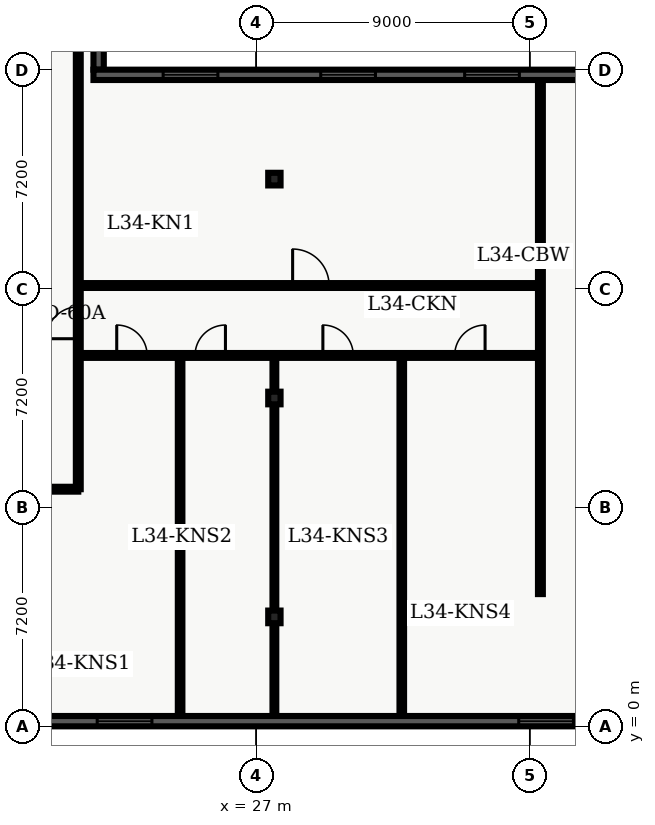
"""IFC4 building model, lengths in metres.
Left out: names, types, materials, properties, quantities, classifications, styles, units other than length and angle.
Written with IfcOpenShell. Run it as: python <this file> out.ifc"""

import sys

from ifc_helpers import new_model, entity, si_unit, converted_unit, direction, frame, origin_with_axes, origin_2d_with_axis, place, context, subcontext, project, spatial, polyline, rectangle, i_section, outline, extrude, element, fill, save


model = new_model("IFC4")
c1 = context("Model", 3, precision=1e-05, world=origin_with_axes(), true_north=direction((0.0, 1.0)))
c2 = subcontext(c1, "Body", "Model", "MODEL_VIEW")
j1 = project(units=[si_unit("LENGTHUNIT", "METRE"), converted_unit("PLANEANGLEUNIT", "DEGREE", entity("IfcPlaneAngleMeasure", 0.017), si_unit("PLANEANGLEUNIT", "RADIAN"), dimensions=[0, 0, 0, 0, 0, 0, 0])], contexts=[c1])
p1 = place(None, origin_with_axes())
s1 = spatial("IfcSite", under=j1, at=p1, CompositionType="ELEMENT")
p2 = place(p1, origin_with_axes())
s2 = spatial("IfcBuilding", under=s1, at=p2, CompositionType="ELEMENT")
p3 = place(p2, frame((0.0, 0.0, 140.7), z_axis=(0.0, 0.0, 1.0), x_axis=(1.0, 0.0, 0.0)))
s3 = spatial("IfcBuildingStorey", under=s2, at=p3, CompositionType="ELEMENT", Elevation=140.7)
for number, where, z_axis, x_axis in (
    (1, (27.6, 3.6, 0.0), (0.0, 0.0, 1.0), (1.0, 0.0, 0.0)),
    (2, (27.6, 10.8, 0.0), (0.0, 0.0, 1.0), (1.0, 0.0, 0.0)),
    (3, (27.6, 18.0, 0.0), (0.0, 0.0, 1.0), (1.0, 0.0, 0.0)),
):
    element("IfcColumn", number, at=place(p3, frame(where, z_axis=z_axis, x_axis=x_axis)), inside=s3, PredefinedType="COLUMN", context=c2, shape_type="SweptSolid", body=[
        extrude(i_section(OverallWidth=0.406, OverallDepth=0.416, WebThickness=0.03, FlangeThickness=0.048, FilletRadius=0.022, at=origin_2d_with_axis()), origin_with_axes(), (0.0, 0.0, 1.0), 3.9),
    ])
p4 = place(p3, frame((2.6, 7.8, 0.0), z_axis=(0.0, 0.0, 1.0), x_axis=(1.0, 0.0, 0.0)))
e4 = element("IfcWall", 4, at=p4, inside=s3, PredefinedType="PARTITIONING", context=c2, shape_type="SweptSolid", body=[
    extrude(outline(polyline([(0.0, -0.08), (18.55, -0.08), (18.55, 0.08), (0.0, 0.08), (0.0, -0.08)])), origin_with_axes(), (0.0, 0.0, 1.0), 2.7),
])
p5 = place(p4, frame((9.245, 0.0, 0.0), z_axis=(0.0, 0.0, 1.0), x_axis=(1.0, 0.0, 0.0)))
e5 = element("IfcOpeningElement", 5, at=p5, cuts=e4, PredefinedType="OPENING", context=c2, shape_type="SweptSolid", body=[
    extrude(rectangle(XDim=1.2, YDim=0.18, at=origin_2d_with_axis()), origin_with_axes(), (0.0, 0.0, 1.0), 2.2),
])
p6 = place(p3, frame((21.15, 7.8, 0.0), z_axis=(0.0, 0.0, 1.0), x_axis=(0.0, 1.0, 0.0)))
e6 = element("IfcWall", 6, at=p6, inside=s3, PredefinedType="PARTITIONING", context=c2, shape_type="SweptSolid", body=[
    extrude(outline(polyline([(0.0, -0.08), (32.7, -0.08), (32.7, 0.08), (0.0, 0.08), (0.0, -0.08)])), origin_with_axes(), (0.0, 0.0, 1.0), 2.7),
])
p7 = place(p6, frame((5.475, 0.0, 0.0), z_axis=(0.0, 0.0, 1.0), x_axis=(1.0, 0.0, 0.0)))
e7 = element("IfcOpeningElement", 7, at=p7, cuts=e6, PredefinedType="OPENING", context=c2, shape_type="SweptSolid", body=[
    extrude(rectangle(XDim=1.05, YDim=0.18, at=origin_2d_with_axis()), origin_with_axes(), (0.0, 0.0, 1.0), 2.15),
])
p8 = place(p3, frame((21.15, 12.2, 0.0), z_axis=(0.0, 0.0, 1.0), x_axis=(1.0, 0.0, 0.0)))
e8 = element("IfcWall", 8, at=p8, inside=s3, PredefinedType="PARTITIONING", context=c2, shape_type="SweptSolid", body=[
    extrude(outline(polyline([(0.0, -0.08), (15.2, -0.08), (15.2, 0.08), (0.0, 0.08), (0.0, -0.08)])), origin_with_axes(), (0.0, 0.0, 1.0), 2.7),
])
p9 = place(p8, frame((1.764, 0.0, 0.0), z_axis=(0.0, 0.0, 1.0), x_axis=(1.0, 0.0, 0.0)))
e9 = element("IfcOpeningElement", 9, at=p9, cuts=e8, PredefinedType="OPENING", context=c2, shape_type="SweptSolid", body=[
    extrude(rectangle(XDim=1.0, YDim=0.18, at=origin_2d_with_axis()), origin_with_axes(), (0.0, 0.0, 1.0), 2.15),
])
p10 = place(p8, frame((4.34, 0.0, 0.0), z_axis=(0.0, 0.0, 1.0), x_axis=(1.0, 0.0, 0.0)))
e10 = element("IfcOpeningElement", 10, at=p10, cuts=e8, PredefinedType="OPENING", context=c2, shape_type="SweptSolid", body=[
    extrude(rectangle(XDim=1.0, YDim=0.18, at=origin_2d_with_axis()), origin_with_axes(), (0.0, 0.0, 1.0), 2.15),
])
p11 = place(p8, frame((8.545, 0.0, 0.0), z_axis=(0.0, 0.0, 1.0), x_axis=(1.0, 0.0, 0.0)))
e11 = element("IfcOpeningElement", 11, at=p11, cuts=e8, PredefinedType="OPENING", context=c2, shape_type="SweptSolid", body=[
    extrude(rectangle(XDim=1.0, YDim=0.18, at=origin_2d_with_axis()), origin_with_axes(), (0.0, 0.0, 1.0), 2.15),
])
p12 = place(p8, frame((12.88, 0.0, 0.0), z_axis=(0.0, 0.0, 1.0), x_axis=(1.0, 0.0, 0.0)))
e12 = element("IfcOpeningElement", 12, at=p12, cuts=e8, PredefinedType="OPENING", context=c2, shape_type="SweptSolid", body=[
    extrude(rectangle(XDim=1.0, YDim=0.18, at=origin_2d_with_axis()), origin_with_axes(), (0.0, 0.0, 1.0), 2.15),
])
p13 = place(p3, frame((21.15, 14.5, 0.0), z_axis=(0.0, 0.0, 1.0), x_axis=(1.0, 0.0, 0.0)))
e13 = element("IfcWall", 13, at=p13, inside=s3, PredefinedType="PARTITIONING", context=c2, shape_type="SweptSolid", body=[
    extrude(outline(polyline([(0.0, -0.08), (15.2, -0.08), (15.2, 0.08), (0.0, 0.08), (0.0, -0.08)])), origin_with_axes(), (0.0, 0.0, 1.0), 2.7),
])
p14 = place(p13, frame((7.65, 0.0, 0.0), z_axis=(0.0, 0.0, 1.0), x_axis=(1.0, 0.0, 0.0)))
e14 = element("IfcOpeningElement", 14, at=p14, cuts=e13, PredefinedType="OPENING", context=c2, shape_type="SweptSolid", body=[
    extrude(rectangle(XDim=1.2, YDim=0.18, at=origin_2d_with_axis()), origin_with_axes(), (0.0, 0.0, 1.0), 2.2),
])
p15 = place(p3, frame((36.35, 4.35, 0.0), z_axis=(0.0, 0.0, 1.0), x_axis=(0.0, 1.0, 0.0)))
e15 = element("IfcWall", 15, at=p15, inside=s3, PredefinedType="PARTITIONING", context=c2, shape_type="SweptSolid", body=[
    extrude(outline(polyline([(0.0, -0.08), (16.95, -0.08), (16.95, 0.08), (0.0, 0.08), (0.0, -0.08)])), origin_with_axes(), (0.0, 0.0, 1.0), 2.7),
])
p16 = place(p3, frame((24.499, 0.335, 0.0), z_axis=(0.0, 0.0, 1.0), x_axis=(0.0, 1.0, 0.0)))
e16 = element("IfcWall", 16, at=p16, inside=s3, PredefinedType="PARTITIONING", context=c2, shape_type="SweptSolid", body=[
    extrude(outline(polyline([(0.0, -0.075), (11.745, -0.075), (11.745, 0.075), (0.0, 0.075), (0.0, -0.075)])), origin_with_axes(), (0.0, 0.0, 1.0), 2.7),
])
p17 = place(p3, frame((27.6, 0.335, 0.0), z_axis=(0.0, 0.0, 1.0), x_axis=(0.0, 1.0, 0.0)))
e17 = element("IfcWall", 17, at=p17, inside=s3, PredefinedType="PARTITIONING", context=c2, shape_type="SweptSolid", body=[
    extrude(outline(polyline([(0.0, -0.062), (11.745, -0.062), (11.745, 0.062), (0.0, 0.062), (0.0, -0.062)])), origin_with_axes(), (0.0, 0.0, 1.0), 2.7),
])
p18 = place(p3, frame((31.79, 0.335, 0.0), z_axis=(0.0, 0.0, 1.0), x_axis=(0.0, 1.0, 0.0)))
e18 = element("IfcWall", 18, at=p18, inside=s3, PredefinedType="PARTITIONING", context=c2, shape_type="SweptSolid", body=[
    extrude(outline(polyline([(0.0, -0.075), (11.745, -0.075), (11.745, 0.075), (0.0, 0.075), (0.0, -0.075)])), origin_with_axes(), (0.0, 0.0, 1.0), 2.7),
])
p19 = place(p3, frame((57.26, 0.17, 0.0), z_axis=(0.0, 0.0, 1.0), x_axis=(-1.0, 0.0, 0.0)))
e19 = element("IfcWall", 19, at=p19, inside=s3, PredefinedType="SOLIDWALL", context=c2, shape_type="SweptSolid", body=[
    extrude(outline(polyline([(0.0, -0.17), (54.86, -0.17), (54.86, 0.17), (0.0, 0.17), (0.0, -0.17)])), origin_with_axes(), (0.0, 0.0, 1.0), 3.66),
])
p20 = place(p19, frame((2.836, 0.0, 0.45), z_axis=(0.0, 0.0, 1.0), x_axis=(1.0, 0.0, 0.0)))
e20 = element("IfcOpeningElement", 20, at=p20, cuts=e19, PredefinedType="OPENING", context=c2, shape_type="SweptSolid", body=[
    extrude(rectangle(XDim=1.8, YDim=0.36, at=origin_2d_with_axis()), origin_with_axes(), (0.0, 0.0, 1.0), 2.1),
])
p21 = place(p19, frame((7.307, 0.0, 0.45), z_axis=(0.0, 0.0, 1.0), x_axis=(1.0, 0.0, 0.0)))
e21 = element("IfcOpeningElement", 21, at=p21, cuts=e19, PredefinedType="OPENING", context=c2, shape_type="SweptSolid", body=[
    extrude(rectangle(XDim=1.8, YDim=0.36, at=origin_2d_with_axis()), origin_with_axes(), (0.0, 0.0, 1.0), 2.1),
])
p22 = place(p19, frame((11.779, 0.0, 0.45), z_axis=(0.0, 0.0, 1.0), x_axis=(1.0, 0.0, 0.0)))
e22 = element("IfcOpeningElement", 22, at=p22, cuts=e19, PredefinedType="OPENING", context=c2, shape_type="SweptSolid", body=[
    extrude(rectangle(XDim=1.8, YDim=0.36, at=origin_2d_with_axis()), origin_with_axes(), (0.0, 0.0, 1.0), 2.1),
])
p23 = place(p19, frame((16.251, 0.0, 0.45), z_axis=(0.0, 0.0, 1.0), x_axis=(1.0, 0.0, 0.0)))
e23 = element("IfcOpeningElement", 23, at=p23, cuts=e19, PredefinedType="OPENING", context=c2, shape_type="SweptSolid", body=[
    extrude(rectangle(XDim=1.8, YDim=0.36, at=origin_2d_with_axis()), origin_with_axes(), (0.0, 0.0, 1.0), 2.1),
])
p24 = place(p19, frame((20.723, 0.0, 0.45), z_axis=(0.0, 0.0, 1.0), x_axis=(1.0, 0.0, 0.0)))
e24 = element("IfcOpeningElement", 24, at=p24, cuts=e19, PredefinedType="OPENING", context=c2, shape_type="SweptSolid", body=[
    extrude(rectangle(XDim=1.8, YDim=0.36, at=origin_2d_with_axis()), origin_with_axes(), (0.0, 0.0, 1.0), 2.1),
])
p25 = place(p19, frame((34.588, 0.0, 0.45), z_axis=(0.0, 0.0, 1.0), x_axis=(1.0, 0.0, 0.0)))
e25 = element("IfcOpeningElement", 25, at=p25, cuts=e19, PredefinedType="OPENING", context=c2, shape_type="SweptSolid", body=[
    extrude(rectangle(XDim=1.8, YDim=0.36, at=origin_2d_with_axis()), origin_with_axes(), (0.0, 0.0, 1.0), 2.1),
])
p26 = place(p19, frame((38.609, 0.0, 0.45), z_axis=(0.0, 0.0, 1.0), x_axis=(1.0, 0.0, 0.0)))
e26 = element("IfcOpeningElement", 26, at=p26, cuts=e19, PredefinedType="OPENING", context=c2, shape_type="SweptSolid", body=[
    extrude(rectangle(XDim=1.8, YDim=0.36, at=origin_2d_with_axis()), origin_with_axes(), (0.0, 0.0, 1.0), 2.1),
])
p27 = place(p19, frame((43.081, 0.0, 0.45), z_axis=(0.0, 0.0, 1.0), x_axis=(1.0, 0.0, 0.0)))
e27 = element("IfcOpeningElement", 27, at=p27, cuts=e19, PredefinedType="OPENING", context=c2, shape_type="SweptSolid", body=[
    extrude(rectangle(XDim=1.8, YDim=0.36, at=origin_2d_with_axis()), origin_with_axes(), (0.0, 0.0, 1.0), 2.1),
])
p28 = place(p19, frame((47.553, 0.0, 0.45), z_axis=(0.0, 0.0, 1.0), x_axis=(1.0, 0.0, 0.0)))
e28 = element("IfcOpeningElement", 28, at=p28, cuts=e19, PredefinedType="OPENING", context=c2, shape_type="SweptSolid", body=[
    extrude(rectangle(XDim=1.8, YDim=0.36, at=origin_2d_with_axis()), origin_with_axes(), (0.0, 0.0, 1.0), 2.1),
])
p29 = place(p19, frame((52.024, 0.0, 0.45), z_axis=(0.0, 0.0, 1.0), x_axis=(1.0, 0.0, 0.0)))
e29 = element("IfcOpeningElement", 29, at=p29, cuts=e19, PredefinedType="OPENING", context=c2, shape_type="SweptSolid", body=[
    extrude(rectangle(XDim=1.8, YDim=0.36, at=origin_2d_with_axis()), origin_with_axes(), (0.0, 0.0, 1.0), 2.1),
])
p30 = place(p3, frame((21.819, 46.46, 0.0), z_axis=(0.0, 0.0, 1.0), x_axis=(0.0, -1.0, 0.0)))
e30 = element("IfcWall", 30, at=p30, inside=s3, PredefinedType="SOLIDWALL", context=c2, shape_type="SweptSolid", body=[
    extrude(outline(polyline([(0.0, -0.17), (24.86, -0.17), (24.86, 0.17), (0.0, 0.17), (0.0, -0.17)])), origin_with_axes(), (0.0, 0.0, 1.0), 3.66),
])
p31 = place(p30, frame((2.966, 0.0, 0.45), z_axis=(0.0, 0.0, 1.0), x_axis=(1.0, 0.0, 0.0)))
e31 = element("IfcOpeningElement", 31, at=p31, cuts=e30, PredefinedType="OPENING", context=c2, shape_type="SweptSolid", body=[
    extrude(rectangle(XDim=1.6, YDim=0.36, at=origin_2d_with_axis()), origin_with_axes(), (0.0, 0.0, 1.0), 2.2),
])
p32 = place(p30, frame((7.698, 0.0, 0.45), z_axis=(0.0, 0.0, 1.0), x_axis=(1.0, 0.0, 0.0)))
e32 = element("IfcOpeningElement", 32, at=p32, cuts=e30, PredefinedType="OPENING", context=c2, shape_type="SweptSolid", body=[
    extrude(rectangle(XDim=1.6, YDim=0.36, at=origin_2d_with_axis()), origin_with_axes(), (0.0, 0.0, 1.0), 2.2),
])
p33 = place(p30, frame((12.43, 0.0, 0.45), z_axis=(0.0, 0.0, 1.0), x_axis=(1.0, 0.0, 0.0)))
e33 = element("IfcOpeningElement", 33, at=p33, cuts=e30, PredefinedType="OPENING", context=c2, shape_type="SweptSolid", body=[
    extrude(rectangle(XDim=1.6, YDim=0.36, at=origin_2d_with_axis()), origin_with_axes(), (0.0, 0.0, 1.0), 2.2),
])
p34 = place(p30, frame((17.162, 0.0, 0.45), z_axis=(0.0, 0.0, 1.0), x_axis=(1.0, 0.0, 0.0)))
e34 = element("IfcOpeningElement", 34, at=p34, cuts=e30, PredefinedType="OPENING", context=c2, shape_type="SweptSolid", body=[
    extrude(rectangle(XDim=1.6, YDim=0.36, at=origin_2d_with_axis()), origin_with_axes(), (0.0, 0.0, 1.0), 2.2),
])
p35 = place(p30, frame((21.894, 0.0, 0.45), z_axis=(0.0, 0.0, 1.0), x_axis=(1.0, 0.0, 0.0)))
e35 = element("IfcOpeningElement", 35, at=p35, cuts=e30, PredefinedType="OPENING", context=c2, shape_type="SweptSolid", body=[
    extrude(rectangle(XDim=1.6, YDim=0.36, at=origin_2d_with_axis()), origin_with_axes(), (0.0, 0.0, 1.0), 2.2),
])
p36 = place(p3, frame((21.649, 21.43, 0.0), z_axis=(0.0, 0.0, 1.0), x_axis=(1.0, 0.0, 0.0)))
e36 = element("IfcWall", 36, at=p36, inside=s3, PredefinedType="SOLIDWALL", context=c2, shape_type="SweptSolid", body=[
    extrude(outline(polyline([(0.0, -0.17), (16.751, -0.17), (16.751, 0.17), (0.0, 0.17), (0.0, -0.17)])), origin_with_axes(), (0.0, 0.0, 1.0), 3.66),
])
p37 = place(p36, frame((3.192, 0.0, 0.45), z_axis=(0.0, 0.0, 1.0), x_axis=(1.0, 0.0, 0.0)))
e37 = element("IfcOpeningElement", 37, at=p37, cuts=e36, PredefinedType="OPENING", context=c2, shape_type="SweptSolid", body=[
    extrude(rectangle(XDim=1.8, YDim=0.36, at=origin_2d_with_axis()), origin_with_axes(), (0.0, 0.0, 1.0), 2.1),
])
p38 = place(p36, frame((8.375, 0.0, 0.45), z_axis=(0.0, 0.0, 1.0), x_axis=(1.0, 0.0, 0.0)))
e38 = element("IfcOpeningElement", 38, at=p38, cuts=e36, PredefinedType="OPENING", context=c2, shape_type="SweptSolid", body=[
    extrude(rectangle(XDim=1.8, YDim=0.36, at=origin_2d_with_axis()), origin_with_axes(), (0.0, 0.0, 1.0), 2.1),
])
p39 = place(p36, frame((13.109, 0.0, 0.45), z_axis=(0.0, 0.0, 1.0), x_axis=(1.0, 0.0, 0.0)))
e39 = element("IfcOpeningElement", 39, at=p39, cuts=e36, PredefinedType="OPENING", context=c2, shape_type="SweptSolid", body=[
    extrude(rectangle(XDim=1.8, YDim=0.36, at=origin_2d_with_axis()), origin_with_axes(), (0.0, 0.0, 1.0), 2.1),
])
p40 = place(p6, frame((5.475, 0.0, 0.0), z_axis=(0.0, 0.0, 1.0), x_axis=(1.0, 0.0, 0.0)))
e40 = element("IfcDoor", 40, at=p40, inside=s3, OperationType="SINGLE_SWING_LEFT", PredefinedType="DOOR", context=c2, shape_type="SweptSolid", body=[
    extrude(rectangle(XDim=1.05, YDim=0.09, at=origin_2d_with_axis()), origin_with_axes(), (0.0, 0.0, 1.0), 2.15),
])
fill(e7, e40)
p41 = place(p8, frame((1.764, 0.0, 0.0), z_axis=(0.0, 0.0, 1.0), x_axis=(1.0, 0.0, 0.0)))
e41 = element("IfcDoor", 41, at=p41, inside=s3, OperationType="SINGLE_SWING_LEFT", PredefinedType="DOOR", context=c2, shape_type="SweptSolid", body=[
    extrude(rectangle(XDim=1.0, YDim=0.09, at=origin_2d_with_axis()), origin_with_axes(), (0.0, 0.0, 1.0), 2.15),
])
fill(e9, e41)
p42 = place(p8, frame((4.34, 0.0, 0.0), z_axis=(0.0, 0.0, 1.0), x_axis=(1.0, 0.0, 0.0)))
e42 = element("IfcDoor", 42, at=p42, inside=s3, OperationType="SINGLE_SWING_RIGHT", PredefinedType="DOOR", context=c2, shape_type="SweptSolid", body=[
    extrude(rectangle(XDim=1.0, YDim=0.09, at=origin_2d_with_axis()), origin_with_axes(), (0.0, 0.0, 1.0), 2.15),
])
fill(e10, e42)
p43 = place(p8, frame((8.545, 0.0, 0.0), z_axis=(0.0, 0.0, 1.0), x_axis=(1.0, 0.0, 0.0)))
e43 = element("IfcDoor", 43, at=p43, inside=s3, OperationType="SINGLE_SWING_LEFT", PredefinedType="DOOR", context=c2, shape_type="SweptSolid", body=[
    extrude(rectangle(XDim=1.0, YDim=0.09, at=origin_2d_with_axis()), origin_with_axes(), (0.0, 0.0, 1.0), 2.15),
])
fill(e11, e43)
p44 = place(p8, frame((12.88, 0.0, 0.0), z_axis=(0.0, 0.0, 1.0), x_axis=(1.0, 0.0, 0.0)))
e44 = element("IfcDoor", 44, at=p44, inside=s3, OperationType="SINGLE_SWING_RIGHT", PredefinedType="DOOR", context=c2, shape_type="SweptSolid", body=[
    extrude(rectangle(XDim=1.0, YDim=0.09, at=origin_2d_with_axis()), origin_with_axes(), (0.0, 0.0, 1.0), 2.15),
])
fill(e12, e44)
p45 = place(p13, frame((7.65, 0.0, 0.0), z_axis=(0.0, 0.0, 1.0), x_axis=(1.0, 0.0, 0.0)))
e45 = element("IfcDoor", 45, at=p45, inside=s3, OperationType="SINGLE_SWING_LEFT", PredefinedType="DOOR", context=c2, shape_type="SweptSolid", body=[
    extrude(rectangle(XDim=1.2, YDim=0.09, at=origin_2d_with_axis()), origin_with_axes(), (0.0, 0.0, 1.0), 2.2),
])
fill(e14, e45)
p46 = place(p19, frame((20.723, 0.0, 0.45), z_axis=(0.0, 0.0, 1.0), x_axis=(1.0, 0.0, 0.0)))
e46 = element("IfcWindow", 46, at=p46, inside=s3, PredefinedType="WINDOW", context=c2, shape_type="SweptSolid", body=[
    extrude(rectangle(XDim=1.8, YDim=0.09, at=origin_2d_with_axis()), origin_with_axes(), (0.0, 0.0, 1.0), 2.1),
])
fill(e24, e46)
p47 = place(p19, frame((34.588, 0.0, 0.45), z_axis=(0.0, 0.0, 1.0), x_axis=(1.0, 0.0, 0.0)))
e47 = element("IfcWindow", 47, at=p47, inside=s3, PredefinedType="WINDOW", context=c2, shape_type="SweptSolid", body=[
    extrude(rectangle(XDim=1.8, YDim=0.09, at=origin_2d_with_axis()), origin_with_axes(), (0.0, 0.0, 1.0), 2.1),
])
fill(e25, e47)
p48 = place(p36, frame((3.192, 0.0, 0.45), z_axis=(0.0, 0.0, 1.0), x_axis=(1.0, 0.0, 0.0)))
e48 = element("IfcWindow", 48, at=p48, inside=s3, PredefinedType="WINDOW", context=c2, shape_type="SweptSolid", body=[
    extrude(rectangle(XDim=1.8, YDim=0.09, at=origin_2d_with_axis()), origin_with_axes(), (0.0, 0.0, 1.0), 2.1),
])
fill(e37, e48)
p49 = place(p36, frame((8.375, 0.0, 0.45), z_axis=(0.0, 0.0, 1.0), x_axis=(1.0, 0.0, 0.0)))
e49 = element("IfcWindow", 49, at=p49, inside=s3, PredefinedType="WINDOW", context=c2, shape_type="SweptSolid", body=[
    extrude(rectangle(XDim=1.8, YDim=0.09, at=origin_2d_with_axis()), origin_with_axes(), (0.0, 0.0, 1.0), 2.1),
])
fill(e38, e49)
p50 = place(p36, frame((13.109, 0.0, 0.45), z_axis=(0.0, 0.0, 1.0), x_axis=(1.0, 0.0, 0.0)))
e50 = element("IfcWindow", 50, at=p50, inside=s3, PredefinedType="WINDOW", context=c2, shape_type="SweptSolid", body=[
    extrude(rectangle(XDim=1.8, YDim=0.09, at=origin_2d_with_axis()), origin_with_axes(), (0.0, 0.0, 1.0), 2.1),
])
fill(e39, e50)
save(model, sys.argv[1])
